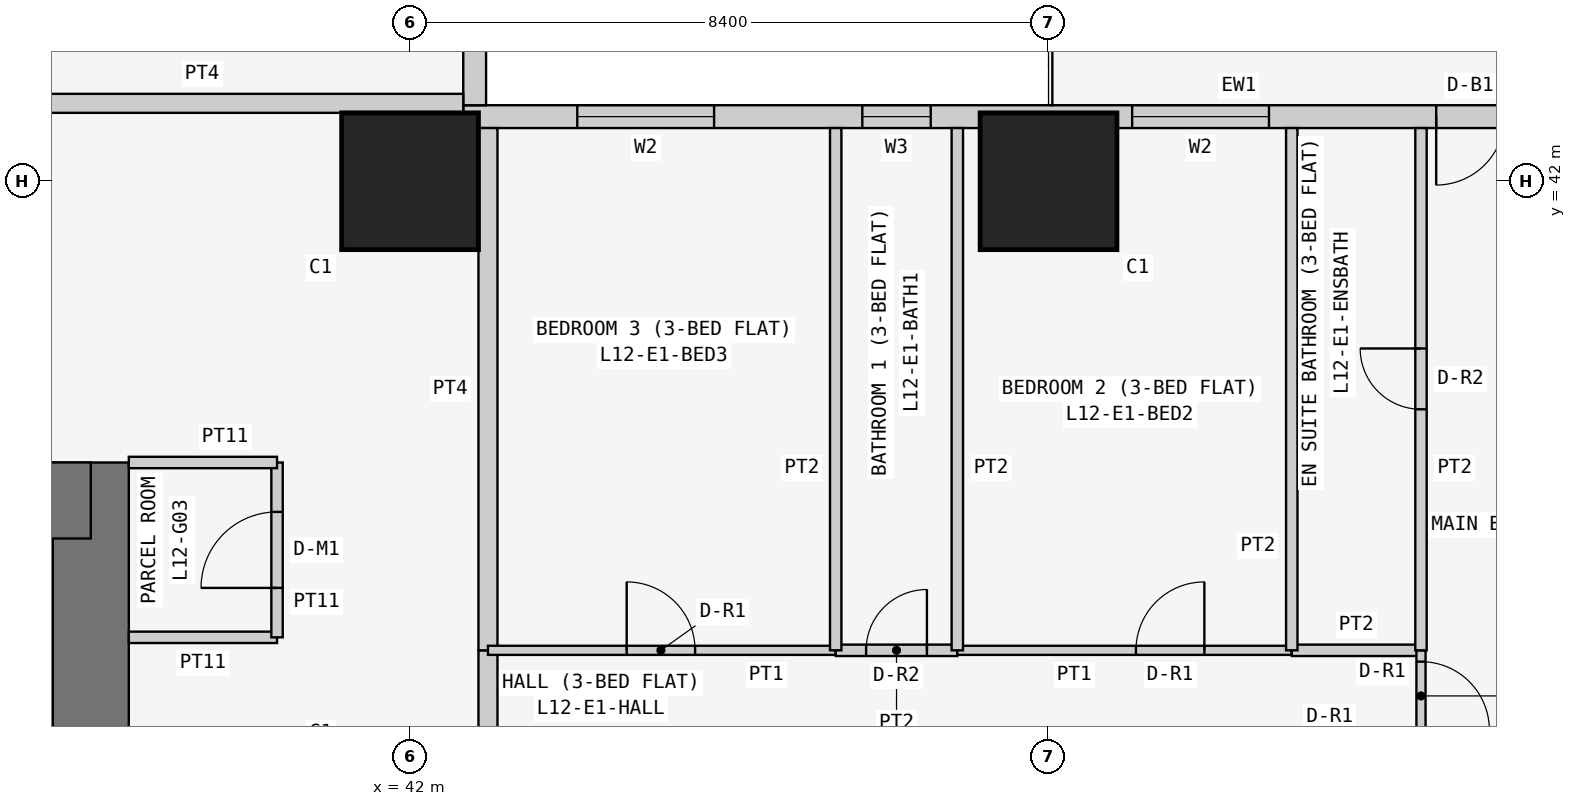
"""IFC4 building model, lengths in metres.
Left out: names, types, materials, properties, quantities, classifications, styles, units other than length and angle.
Written with IfcOpenShell. Run it as: python <this file> out.ifc"""

import sys

from ifc_helpers import new_model, si_unit, direction, frame, frame_2d, origin, origin_2d, place, context, subcontext, project, spatial, rectangle, extrude, element, fill, save


model = new_model("IFC4")
c1 = context("Model", 3, precision=1e-05, world=origin(), true_north=direction((0.0, 1.0)))
c2 = subcontext(c1, "Body", "Model", "MODEL_VIEW")
j1 = project(units=[si_unit("LENGTHUNIT", "METRE"), si_unit("PLANEANGLEUNIT", "RADIAN")], contexts=[c1])
p1 = place(None, origin())
s1 = spatial("IfcSite", under=j1, at=p1, CompositionType="ELEMENT")
p2 = place(p1, origin())
s2 = spatial("IfcBuilding", under=s1, at=p2, CompositionType="ELEMENT")
p3 = place(p2, frame((0.0, 0.0, 52.5)))
s3 = spatial("IfcBuildingStorey", under=s2, at=p3, CompositionType="ELEMENT", Elevation=52.5)
for number, where, z_axis, x_axis in (
    (1, (42.0, 42.0, 0.0), (0.0, 0.0, 1.0), (1.0, 0.0, 0.0)),
    (2, (50.4, 42.0, 0.0), (0.0, 0.0, 1.0), (1.0, 0.0, 0.0)),
):
    element("IfcColumn", number, at=place(p3, frame(where, z_axis=z_axis, x_axis=x_axis)), inside=s3, PredefinedType="COLUMN", context=c2, shape_type="SweptSolid", body=[
        extrude(rectangle(XDim=1.8, YDim=1.8, at=origin_2d()), origin(), (0.0, 0.0, 1.0), 3.6),
    ])
p4 = place(p3, frame((37.8, 21.0, 0.0), z_axis=(0.0, 0.0, 1.0), x_axis=(0.0, 1.0, 0.0)))
e3 = element("IfcWall", 3, at=p4, inside=s3, PredefinedType="SHEAR", context=c2, shape_type="SweptSolid", body=[
    extrude(rectangle(XDim=17.3, YDim=1.0, at=frame_2d((8.65, 0.0))), origin(), (0.0, 0.0, 1.0), 3.6),
])
p5 = place(p4, frame((5.2, 0.0, 0.0)))
e4 = element("IfcOpeningElement", 4, at=p5, cuts=e3, PredefinedType="OPENING", context=c2, shape_type="SweptSolid", body=[
    extrude(rectangle(XDim=1.2, YDim=2.1, at=frame_2d((0.6, 1.05))), frame((0.0, 0.51, 0.0), z_axis=(0.0, -1.0, 0.0), x_axis=(1.0, 0.0, 0.0)), (0.0, 0.0, 1.0), 1.02),
])
p6 = place(p3, frame((37.8, 37.8, 0.0), z_axis=(0.0, 0.0, 1.0), x_axis=(-1.0, 0.0, 0.0)))
e5 = element("IfcWall", 5, at=p6, inside=s3, PredefinedType="SHEAR", context=c2, shape_type="SweptSolid", body=[
    extrude(rectangle(XDim=17.3, YDim=1.0, at=frame_2d((8.65, 0.0))), origin(), (0.0, 0.0, 1.0), 3.6),
])
p7 = place(p3, frame((58.4, 42.85, 0.0), z_axis=(0.0, 0.0, 1.0), x_axis=(-1.0, 0.0, 0.0)))
e6 = element("IfcWall", 6, at=p7, inside=s3, PredefinedType="SOLIDWALL", context=c2, shape_type="SweptSolid", body=[
    extrude(rectangle(XDim=15.7, YDim=0.3, at=frame_2d((7.85, 0.0))), origin(), (0.0, 0.0, 1.0), 3.45),
])
p8 = place(p7, frame((12.4, 0.0, 0.9)))
e7 = element("IfcOpeningElement", 7, at=p8, cuts=e6, PredefinedType="OPENING", context=c2, shape_type="SweptSolid", body=[
    extrude(rectangle(XDim=1.8, YDim=1.5, at=frame_2d((0.9, 0.75))), frame((0.0, 0.16, 0.0), z_axis=(0.0, -1.0, 0.0), x_axis=(1.0, 0.0, 0.0)), (0.0, 0.0, 1.0), 0.32),
])
p9 = place(p7, frame((9.55, 0.0, 1.5)))
e8 = element("IfcOpeningElement", 8, at=p9, cuts=e6, PredefinedType="OPENING", context=c2, shape_type="SweptSolid", body=[
    extrude(rectangle(XDim=0.9, YDim=0.7, at=frame_2d((0.45, 0.35))), frame((0.0, 0.16, 0.0), z_axis=(0.0, -1.0, 0.0), x_axis=(1.0, 0.0, 0.0)), (0.0, 0.0, 1.0), 0.32),
])
p10 = place(p7, frame((5.1, 0.0, 0.9)))
e9 = element("IfcOpeningElement", 9, at=p10, cuts=e6, PredefinedType="OPENING", context=c2, shape_type="SweptSolid", body=[
    extrude(rectangle(XDim=1.8, YDim=1.5, at=frame_2d((0.9, 0.75))), frame((0.0, 0.16, 0.0), z_axis=(0.0, -1.0, 0.0), x_axis=(1.0, 0.0, 0.0)), (0.0, 0.0, 1.0), 0.32),
])
p11 = place(p7, frame((2.0, 0.0, 0.0)))
e10 = element("IfcOpeningElement", 10, at=p11, cuts=e6, PredefinedType="OPENING", context=c2, shape_type="SweptSolid", body=[
    extrude(rectangle(XDim=0.9, YDim=2.4, at=frame_2d((0.45, 1.2))), frame((0.0, 0.16, 0.0), z_axis=(0.0, -1.0, 0.0), x_axis=(1.0, 0.0, 0.0)), (0.0, 0.0, 1.0), 0.32),
])
p12 = place(p7, frame((0.7, 0.0, 0.9)))
e11 = element("IfcOpeningElement", 11, at=p12, cuts=e6, PredefinedType="OPENING", context=c2, shape_type="SweptSolid", body=[
    extrude(rectangle(XDim=1.2, YDim=1.5, at=frame_2d((0.6, 0.75))), frame((0.0, 0.16, 0.0), z_axis=(0.0, -1.0, 0.0), x_axis=(1.0, 0.0, 0.0)), (0.0, 0.0, 1.0), 0.32),
])
p13 = place(p3, frame((42.85, 43.0, 0.0), z_axis=(0.0, 0.0, 1.0), x_axis=(0.0, 1.0, 0.0)))
e12 = element("IfcWall", 12, at=p13, inside=s3, PredefinedType="SOLIDWALL", context=c2, shape_type="SweptSolid", body=[
    extrude(rectangle(XDim=15.4, YDim=0.3, at=frame_2d((7.7, 0.0))), origin(), (0.0, 0.0, 1.0), 3.45),
])
p14 = place(p13, frame((1.2, 0.0, 0.9)))
e13 = element("IfcOpeningElement", 13, at=p14, cuts=e12, PredefinedType="OPENING", context=c2, shape_type="SweptSolid", body=[
    extrude(rectangle(XDim=1.8, YDim=1.5, at=frame_2d((0.9, 0.75))), frame((0.0, 0.16, 0.0), z_axis=(0.0, -1.0, 0.0), x_axis=(1.0, 0.0, 0.0)), (0.0, 0.0, 1.0), 0.32),
])
p15 = place(p13, frame((4.95, 0.0, 1.5)))
e14 = element("IfcOpeningElement", 14, at=p15, cuts=e12, PredefinedType="OPENING", context=c2, shape_type="SweptSolid", body=[
    extrude(rectangle(XDim=0.9, YDim=0.7, at=frame_2d((0.45, 0.35))), frame((0.0, 0.16, 0.0), z_axis=(0.0, -1.0, 0.0), x_axis=(1.0, 0.0, 0.0)), (0.0, 0.0, 1.0), 0.32),
])
p16 = place(p13, frame((8.5, 0.0, 0.9)))
e15 = element("IfcOpeningElement", 15, at=p16, cuts=e12, PredefinedType="OPENING", context=c2, shape_type="SweptSolid", body=[
    extrude(rectangle(XDim=1.8, YDim=1.5, at=frame_2d((0.9, 0.75))), frame((0.0, 0.16, 0.0), z_axis=(0.0, -1.0, 0.0), x_axis=(1.0, 0.0, 0.0)), (0.0, 0.0, 1.0), 0.32),
])
p17 = place(p13, frame((12.5, 0.0, 0.0)))
e16 = element("IfcOpeningElement", 16, at=p17, cuts=e12, PredefinedType="OPENING", context=c2, shape_type="SweptSolid", body=[
    extrude(rectangle(XDim=0.9, YDim=2.4, at=frame_2d((0.45, 1.2))), frame((0.0, 0.16, 0.0), z_axis=(0.0, -1.0, 0.0), x_axis=(1.0, 0.0, 0.0)), (0.0, 0.0, 1.0), 0.32),
])
p18 = place(p13, frame((13.5, 0.0, 0.9)))
e17 = element("IfcOpeningElement", 17, at=p18, cuts=e12, PredefinedType="OPENING", context=c2, shape_type="SweptSolid", body=[
    extrude(rectangle(XDim=1.2, YDim=1.5, at=frame_2d((0.6, 0.75))), frame((0.0, 0.16, 0.0), z_axis=(0.0, -1.0, 0.0), x_axis=(1.0, 0.0, 0.0)), (0.0, 0.0, 1.0), 0.32),
])
p19 = place(p3, frame((38.3, 36.0, 0.0), z_axis=(0.0, 0.0, 1.0), x_axis=(1.0, 0.0, 0.0)))
e18 = element("IfcWall", 18, at=p19, inside=s3, PredefinedType="PARTITIONING", context=c2, shape_type="SweptSolid", body=[
    extrude(rectangle(XDim=1.95, YDim=0.15, at=frame_2d((0.975, 0.0))), origin(), (0.0, 0.0, 1.0), 3.45),
])
p20 = place(p3, frame((40.25, 36.0, 0.0), z_axis=(0.0, 0.0, 1.0), x_axis=(0.0, 1.0, 0.0)))
e19 = element("IfcWall", 19, at=p20, inside=s3, PredefinedType="PARTITIONING", context=c2, shape_type="SweptSolid", body=[
    extrude(rectangle(XDim=2.3, YDim=0.15, at=frame_2d((1.15, 0.0))), origin(), (0.0, 0.0, 1.0), 3.45),
])
p21 = place(p20, frame((0.65, 0.0, 0.0)))
e20 = element("IfcOpeningElement", 20, at=p21, cuts=e19, PredefinedType="OPENING", context=c2, shape_type="SweptSolid", body=[
    extrude(rectangle(XDim=1.0, YDim=2.1, at=frame_2d((0.5, 1.05))), frame((0.0, 0.085, 0.0), z_axis=(0.0, -1.0, 0.0), x_axis=(1.0, 0.0, 0.0)), (0.0, 0.0, 1.0), 0.17),
])
p22 = place(p3, frame((40.25, 38.3, 0.0), z_axis=(0.0, 0.0, 1.0), x_axis=(-1.0, 0.0, 0.0)))
e21 = element("IfcWall", 21, at=p22, inside=s3, PredefinedType="PARTITIONING", context=c2, shape_type="SweptSolid", body=[
    extrude(rectangle(XDim=1.95, YDim=0.15, at=frame_2d((0.975, 0.0))), origin(), (0.0, 0.0, 1.0), 3.45),
])
p23 = place(p3, frame((35.829, 43.025, 0.0), z_axis=(0.0, 0.0, 1.0), x_axis=(1.0, 0.0, 0.0)))
e22 = element("IfcWall", 22, at=p23, inside=s3, PredefinedType="PARTITIONING", context=c2, shape_type="SweptSolid", body=[
    extrude(rectangle(XDim=6.871, YDim=0.25, at=frame_2d((3.436, 0.0))), origin(), (0.0, 0.0, 1.0), 3.45),
])
p24 = place(p3, frame((43.025, 35.829, 0.0), z_axis=(0.0, 0.0, 1.0), x_axis=(0.0, -1.0, 0.0)))
e23 = element("IfcWall", 23, at=p24, inside=s3, PredefinedType="PARTITIONING", context=c2, shape_type="SweptSolid", body=[
    extrude(rectangle(XDim=1.2, YDim=0.25, at=frame_2d((0.6, 0.0))), origin(), (0.0, 0.0, 1.0), 3.45),
])
p25 = place(p3, frame((43.025, 42.7, 0.0), z_axis=(0.0, 0.0, 1.0), x_axis=(0.0, -1.0, 0.0)))
e24 = element("IfcWall", 24, at=p25, inside=s3, PredefinedType="PARTITIONING", context=c2, shape_type="SweptSolid", body=[
    extrude(rectangle(XDim=6.871, YDim=0.25, at=frame_2d((3.436, 0.0))), origin(), (0.0, 0.0, 1.0), 3.45),
])
p26 = place(p3, frame((47.6, 35.829, 0.0), z_axis=(0.0, 0.0, 1.0), x_axis=(-1.0, 0.0, 0.0)))
e25 = element("IfcWall", 25, at=p26, inside=s3, PredefinedType="PARTITIONING", context=c2, shape_type="SweptSolid", body=[
    extrude(rectangle(XDim=4.575, YDim=0.12, at=frame_2d((2.288, 0.0))), origin(), (0.0, 0.0, 1.0), 3.45),
])
p27 = place(p26, frame((1.85, 0.0, 0.0)))
e26 = element("IfcOpeningElement", 26, at=p27, cuts=e25, PredefinedType="OPENING", context=c2, shape_type="SweptSolid", body=[
    extrude(rectangle(XDim=0.9, YDim=2.1, at=frame_2d((0.45, 1.05))), frame((0.0, 0.07, 0.0), z_axis=(0.0, -1.0, 0.0), x_axis=(1.0, 0.0, 0.0)), (0.0, 0.0, 1.0), 0.14),
])
p28 = place(p3, frame((49.2, 35.829, 0.0), z_axis=(0.0, 0.0, 1.0), x_axis=(-1.0, 0.0, 0.0)))
e27 = element("IfcWall", 27, at=p28, inside=s3, PredefinedType="PARTITIONING", context=c2, shape_type="SweptSolid", body=[
    extrude(rectangle(XDim=1.6, YDim=0.15, at=frame_2d((0.8, 0.0))), origin(), (0.0, 0.0, 1.0), 3.45),
])
p29 = place(p28, frame((0.4, 0.0, 0.0)))
e28 = element("IfcOpeningElement", 28, at=p29, cuts=e27, PredefinedType="OPENING", context=c2, shape_type="SweptSolid", body=[
    extrude(rectangle(XDim=0.8, YDim=2.1, at=frame_2d((0.4, 1.05))), frame((0.0, 0.085, 0.0), z_axis=(0.0, -1.0, 0.0), x_axis=(1.0, 0.0, 0.0)), (0.0, 0.0, 1.0), 0.17),
])
p30 = place(p3, frame((53.6, 35.829, 0.0), z_axis=(0.0, 0.0, 1.0), x_axis=(-1.0, 0.0, 0.0)))
e29 = element("IfcWall", 29, at=p30, inside=s3, PredefinedType="PARTITIONING", context=c2, shape_type="SweptSolid", body=[
    extrude(rectangle(XDim=4.4, YDim=0.12, at=frame_2d((2.2, 0.0))), origin(), (0.0, 0.0, 1.0), 3.45),
])
p31 = place(p30, frame((1.15, 0.0, 0.0)))
e30 = element("IfcOpeningElement", 30, at=p31, cuts=e29, PredefinedType="OPENING", context=c2, shape_type="SweptSolid", body=[
    extrude(rectangle(XDim=0.9, YDim=2.1, at=frame_2d((0.45, 1.05))), frame((0.0, 0.07, 0.0), z_axis=(0.0, -1.0, 0.0), x_axis=(1.0, 0.0, 0.0)), (0.0, 0.0, 1.0), 0.14),
])
p32 = place(p3, frame((55.3, 35.829, 0.0), z_axis=(0.0, 0.0, 1.0), x_axis=(-1.0, 0.0, 0.0)))
e31 = element("IfcWall", 31, at=p32, inside=s3, PredefinedType="PARTITIONING", context=c2, shape_type="SweptSolid", body=[
    extrude(rectangle(XDim=1.7, YDim=0.15, at=frame_2d((0.85, 0.0))), origin(), (0.0, 0.0, 1.0), 3.45),
])
p33 = place(p3, frame((55.3, 34.629, 0.0), z_axis=(0.0, 0.0, 1.0), x_axis=(0.0, 1.0, 0.0)))
e32 = element("IfcWall", 32, at=p33, inside=s3, PredefinedType="PARTITIONING", context=c2, shape_type="SweptSolid", body=[
    extrude(rectangle(XDim=1.2, YDim=0.12, at=frame_2d((0.6, 0.0))), origin(), (0.0, 0.0, 1.0), 3.45),
])
p34 = place(p33, frame((0.151, 0.0, 0.0)))
e33 = element("IfcOpeningElement", 33, at=p34, cuts=e32, PredefinedType="OPENING", context=c2, shape_type="SweptSolid", body=[
    extrude(rectangle(XDim=0.9, YDim=2.1, at=frame_2d((0.45, 1.05))), frame((0.0, 0.07, 0.0), z_axis=(0.0, -1.0, 0.0), x_axis=(1.0, 0.0, 0.0)), (0.0, 0.0, 1.0), 0.14),
])
for number, where, z_axis, x_axis in (
    (34, (47.6, 35.829, 0.0), (0.0, 0.0, 1.0), (0.0, 1.0, 0.0)),
    (35, (49.2, 35.829, 0.0), (0.0, 0.0, 1.0), (0.0, 1.0, 0.0)),
    (36, (53.6, 35.829, 0.0), (0.0, 0.0, 1.0), (0.0, 1.0, 0.0)),
):
    element("IfcWall", number, at=place(p3, frame(where, z_axis=z_axis, x_axis=x_axis)), inside=s3, PredefinedType="PARTITIONING", context=c2, shape_type="SweptSolid", body=[
        extrude(rectangle(XDim=6.871, YDim=0.15, at=frame_2d((3.436, 0.0))), origin(), (0.0, 0.0, 1.0), 3.45),
    ])
p35 = place(p3, frame((55.3, 35.829, 0.0), z_axis=(0.0, 0.0, 1.0), x_axis=(0.0, 1.0, 0.0)))
e37 = element("IfcWall", 37, at=p35, inside=s3, PredefinedType="PARTITIONING", context=c2, shape_type="SweptSolid", body=[
    extrude(rectangle(XDim=6.871, YDim=0.15, at=frame_2d((3.436, 0.0))), origin(), (0.0, 0.0, 1.0), 3.45),
])
p36 = place(p35, frame((3.171, 0.0, 0.0)))
e38 = element("IfcOpeningElement", 38, at=p36, cuts=e37, PredefinedType="OPENING", context=c2, shape_type="SweptSolid", body=[
    extrude(rectangle(XDim=0.8, YDim=2.1, at=frame_2d((0.4, 1.05))), frame((0.0, 0.085, 0.0), z_axis=(0.0, -1.0, 0.0), x_axis=(1.0, 0.0, 0.0)), (0.0, 0.0, 1.0), 0.17),
])
p37 = place(p8, origin())
e39 = element("IfcWindow", 39, at=p37, inside=s3, PartitioningType="SINGLE_PANEL", PredefinedType="WINDOW", context=c2, shape_type="SweptSolid", body=[
    extrude(rectangle(XDim=1.8, YDim=1.5, at=frame_2d((0.9, 0.75))), frame((0.0, 0.03, 0.0), z_axis=(0.0, -1.0, 0.0), x_axis=(1.0, 0.0, 0.0)), (0.0, 0.0, 1.0), 0.06),
])
fill(e7, e39)
p38 = place(p9, origin())
e40 = element("IfcWindow", 40, at=p38, inside=s3, PartitioningType="SINGLE_PANEL", PredefinedType="WINDOW", context=c2, shape_type="SweptSolid", body=[
    extrude(rectangle(XDim=0.9, YDim=0.7, at=frame_2d((0.45, 0.35))), frame((0.0, 0.03, 0.0), z_axis=(0.0, -1.0, 0.0), x_axis=(1.0, 0.0, 0.0)), (0.0, 0.0, 1.0), 0.06),
])
fill(e8, e40)
p39 = place(p10, origin())
e41 = element("IfcWindow", 41, at=p39, inside=s3, PartitioningType="SINGLE_PANEL", PredefinedType="WINDOW", context=c2, shape_type="SweptSolid", body=[
    extrude(rectangle(XDim=1.8, YDim=1.5, at=frame_2d((0.9, 0.75))), frame((0.0, 0.03, 0.0), z_axis=(0.0, -1.0, 0.0), x_axis=(1.0, 0.0, 0.0)), (0.0, 0.0, 1.0), 0.06),
])
fill(e9, e41)
p40 = place(p11, origin())
e42 = element("IfcDoor", 42, at=p40, inside=s3, OperationType="SINGLE_SWING_RIGHT", PredefinedType="DOOR", context=c2, shape_type="SweptSolid", body=[
    extrude(rectangle(XDim=0.9, YDim=2.4, at=frame_2d((0.45, 1.2))), frame((0.0, 0.025, 0.0), z_axis=(0.0, -1.0, 0.0), x_axis=(1.0, 0.0, 0.0)), (0.0, 0.0, 1.0), 0.05),
])
fill(e10, e42)
p41 = place(p21, origin())
e43 = element("IfcDoor", 43, at=p41, inside=s3, OperationType="SINGLE_SWING_LEFT", PredefinedType="DOOR", context=c2, shape_type="SweptSolid", body=[
    extrude(rectangle(XDim=1.0, YDim=2.1, at=frame_2d((0.5, 1.05))), frame((0.0, 0.025, 0.0), z_axis=(0.0, -1.0, 0.0), x_axis=(1.0, 0.0, 0.0)), (0.0, 0.0, 1.0), 0.05),
])
fill(e20, e43)
p42 = place(p27, frame((0.9, 0.0, 0.0), z_axis=(0.0, 0.0, 1.0), x_axis=(-1.0, 0.0, 0.0)))
e44 = element("IfcDoor", 44, at=p42, inside=s3, OperationType="SINGLE_SWING_LEFT", PredefinedType="DOOR", context=c2, shape_type="SweptSolid", body=[
    extrude(rectangle(XDim=0.9, YDim=2.1, at=frame_2d((0.45, 1.05))), frame((0.0, 0.025, 0.0), z_axis=(0.0, -1.0, 0.0), x_axis=(1.0, 0.0, 0.0)), (0.0, 0.0, 1.0), 0.05),
])
fill(e26, e44)
p43 = place(p29, frame((0.8, 0.0, 0.0), z_axis=(0.0, 0.0, 1.0), x_axis=(-1.0, 0.0, 0.0)))
e45 = element("IfcDoor", 45, at=p43, inside=s3, OperationType="SINGLE_SWING_RIGHT", PredefinedType="DOOR", context=c2, shape_type="SweptSolid", body=[
    extrude(rectangle(XDim=0.8, YDim=2.1, at=frame_2d((0.4, 1.05))), frame((0.0, 0.025, 0.0), z_axis=(0.0, -1.0, 0.0), x_axis=(1.0, 0.0, 0.0)), (0.0, 0.0, 1.0), 0.05),
])
fill(e28, e45)
p44 = place(p31, frame((0.9, 0.0, 0.0), z_axis=(0.0, 0.0, 1.0), x_axis=(-1.0, 0.0, 0.0)))
e46 = element("IfcDoor", 46, at=p44, inside=s3, OperationType="SINGLE_SWING_RIGHT", PredefinedType="DOOR", context=c2, shape_type="SweptSolid", body=[
    extrude(rectangle(XDim=0.9, YDim=2.1, at=frame_2d((0.45, 1.05))), frame((0.0, 0.025, 0.0), z_axis=(0.0, -1.0, 0.0), x_axis=(1.0, 0.0, 0.0)), (0.0, 0.0, 1.0), 0.05),
])
fill(e30, e46)
p45 = place(p34, frame((0.9, 0.0, 0.0), z_axis=(0.0, 0.0, 1.0), x_axis=(-1.0, 0.0, 0.0)))
e47 = element("IfcDoor", 47, at=p45, inside=s3, OperationType="SINGLE_SWING_RIGHT", PredefinedType="DOOR", context=c2, shape_type="SweptSolid", body=[
    extrude(rectangle(XDim=0.9, YDim=2.1, at=frame_2d((0.45, 1.05))), frame((0.0, 0.025, 0.0), z_axis=(0.0, -1.0, 0.0), x_axis=(1.0, 0.0, 0.0)), (0.0, 0.0, 1.0), 0.05),
])
fill(e33, e47)
p46 = place(p36, origin())
e48 = element("IfcDoor", 48, at=p46, inside=s3, OperationType="SINGLE_SWING_RIGHT", PredefinedType="DOOR", context=c2, shape_type="SweptSolid", body=[
    extrude(rectangle(XDim=0.8, YDim=2.1, at=frame_2d((0.4, 1.05))), frame((0.0, 0.025, 0.0), z_axis=(0.0, -1.0, 0.0), x_axis=(1.0, 0.0, 0.0)), (0.0, 0.0, 1.0), 0.05),
])
fill(e38, e48)
save(model, sys.argv[1])
